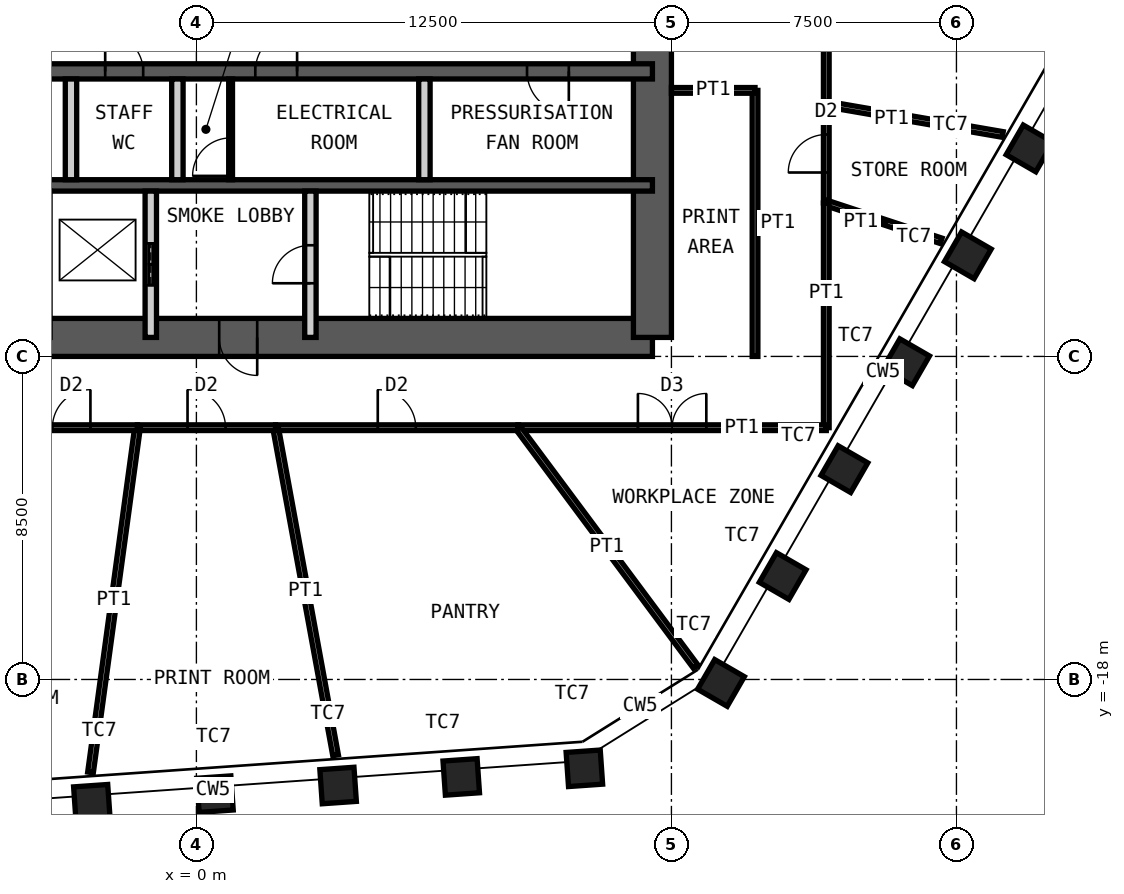
"""IFC4 building model, lengths in metres.
Left out: names, types, materials, properties, quantities, classifications, styles, units other than length and angle.
Written with IfcOpenShell. Run it as: python <this file> out.ifc"""

import sys

from ifc_helpers import new_model, si_unit, direction, frame, frame_2d, origin, origin_2d, place, context, subcontext, project, spatial, rectangle, hollow_rectangle, extrude, element, fill, save


model = new_model("IFC4")
c1 = context("Model", 3, precision=1e-05, world=origin(), true_north=direction((0.0, 1.0)))
c2 = subcontext(c1, "Body", "Model", "MODEL_VIEW")
j1 = project(units=[si_unit("LENGTHUNIT", "METRE"), si_unit("PLANEANGLEUNIT", "RADIAN")], contexts=[c1])
p1 = place(None, origin())
s1 = spatial("IfcSite", under=j1, at=p1, CompositionType="ELEMENT")
p2 = place(p1, origin())
s2 = spatial("IfcBuilding", under=s1, at=p2, CompositionType="ELEMENT")
p3 = place(p2, frame((0.0, 0.0, 278.8)))
s3 = spatial("IfcBuildingStorey", under=s2, at=p3, CompositionType="ELEMENT", Elevation=278.8)
for number, where, z_axis, x_axis in (
    (1, (21.924, -4.027, 0.0), (0.0, 0.0, 1.0), (0.5, 0.866, 0.0)),
    (2, (20.3, -6.84, 0.0), (0.0, 0.0, 1.0), (0.5, 0.866, 0.0)),
    (3, (18.676, -9.653, 0.0), (0.0, 0.0, 1.0), (0.5, 0.866, 0.0)),
    (4, (17.052, -12.466, 0.0), (0.0, 0.0, 1.0), (0.5, 0.866, 0.0)),
    (5, (15.427, -15.279, 0.0), (0.0, 0.0, 1.0), (0.5, 0.866, 0.0)),
    (6, (13.803, -18.092, 0.0), (0.0, 0.0, 1.0), (0.5, 0.866, 0.0)),
    (7, (10.209, -20.337, 0.0), (0.0, 0.0, 1.0), (0.998, 0.07, 0.0)),
    (8, (6.969, -20.564, 0.0), (0.0, 0.0, 1.0), (0.998, 0.07, 0.0)),
    (9, (3.729, -20.791, 0.0), (0.0, 0.0, 1.0), (0.998, 0.07, 0.0)),
    (10, (0.489, -21.017, 0.0), (0.0, 0.0, 1.0), (0.998, 0.07, 0.0)),
    (11, (-2.751, -21.244, 0.0), (0.0, 0.0, 1.0), (0.998, 0.07, 0.0)),
):
    element("IfcColumn", number, at=place(p3, frame(where, z_axis=z_axis, x_axis=x_axis)), inside=s3, PredefinedType="COLUMN", context=c2, shape_type="SweptSolid", body=[
        extrude(hollow_rectangle(XDim=0.9, YDim=0.9, WallThickness=0.06, at=origin_2d()), origin(), (0.0, 0.0, 1.0), 4.2),
    ])
p4 = place(p3, frame((-12.0, -9.0, 0.0), z_axis=(0.0, 0.0, 1.0), x_axis=(1.0, 0.0, 0.0)))
e12 = element("IfcWall", 12, at=p4, inside=s3, PredefinedType="SHEAR", context=c2, shape_type="SweptSolid", body=[
    extrude(rectangle(XDim=24.0, YDim=1.0, at=frame_2d((12.0, 0.0))), origin(), (0.0, 0.0, 1.0), 4.2),
])
p5 = place(p4, frame((1.35, 0.0, 0.0)))
e13 = element("IfcOpeningElement", 13, at=p5, cuts=e12, PredefinedType="OPENING", context=c2, shape_type="SweptSolid", body=[
    extrude(rectangle(XDim=1.0, YDim=2.1, at=frame_2d((0.5, 1.05))), frame((0.0, 0.51, 0.0), z_axis=(0.0, -1.0, 0.0), x_axis=(1.0, 0.0, 0.0)), (0.0, 0.0, 1.0), 1.02),
])
p6 = place(p4, frame((5.325, 0.0, 0.0)))
e14 = element("IfcOpeningElement", 14, at=p6, cuts=e12, PredefinedType="OPENING", context=c2, shape_type="SweptSolid", body=[
    extrude(rectangle(XDim=1.15, YDim=2.1, at=frame_2d((0.575, 1.05))), frame((0.0, 0.51, 0.0), z_axis=(0.0, -1.0, 0.0), x_axis=(1.0, 0.0, 0.0)), (0.0, 0.0, 1.0), 1.02),
])
p7 = place(p4, frame((12.6, 0.0, 0.0)))
e15 = element("IfcOpeningElement", 15, at=p7, cuts=e12, PredefinedType="OPENING", context=c2, shape_type="SweptSolid", body=[
    extrude(rectangle(XDim=1.0, YDim=2.1, at=frame_2d((0.5, 1.05))), frame((0.0, 0.51, 0.0), z_axis=(0.0, -1.0, 0.0), x_axis=(1.0, 0.0, 0.0)), (0.0, 0.0, 1.0), 1.02),
])
p8 = place(p3, frame((12.0, -9.0, 0.0), z_axis=(0.0, 0.0, 1.0), x_axis=(0.0, 1.0, 0.0)))
e16 = element("IfcWall", 16, at=p8, inside=s3, PredefinedType="SHEAR", context=c2, shape_type="SweptSolid", body=[
    extrude(rectangle(XDim=18.0, YDim=1.0, at=frame_2d((9.0, 0.0))), origin(), (0.0, 0.0, 1.0), 4.2),
])
p9 = place(p8, frame((8.1, 0.0, 0.0)))
e17 = element("IfcOpeningElement", 17, at=p9, cuts=e16, PredefinedType="OPENING", context=c2, shape_type="SweptSolid", body=[
    extrude(rectangle(XDim=1.8, YDim=2.1, at=frame_2d((0.9, 1.05))), frame((0.0, 0.51, 0.0), z_axis=(0.0, -1.0, 0.0), x_axis=(1.0, 0.0, 0.0)), (0.0, 0.0, 1.0), 1.02),
])
p10 = place(p3, frame((-12.0, -2.0, 0.0), z_axis=(0.0, 0.0, 1.0), x_axis=(1.0, 0.0, 0.0)))
e18 = element("IfcWall", 18, at=p10, inside=s3, PredefinedType="SHEAR", context=c2, shape_type="SweptSolid", body=[
    extrude(rectangle(XDim=24.0, YDim=0.4, at=frame_2d((12.0, 0.0))), origin(), (0.0, 0.0, 1.0), 4.2),
])
p11 = place(p10, frame((1.1, 0.0, 0.0)))
e19 = element("IfcOpeningElement", 19, at=p11, cuts=e18, PredefinedType="OPENING", context=c2, shape_type="SweptSolid", body=[
    extrude(rectangle(XDim=1.1, YDim=2.1, at=frame_2d((0.55, 1.05))), frame((0.0, 0.21, 0.0), z_axis=(0.0, -1.0, 0.0), x_axis=(1.0, 0.0, 0.0)), (0.0, 0.0, 1.0), 0.42),
])
p12 = place(p10, frame((13.55, 0.0, 0.0)))
e20 = element("IfcOpeningElement", 20, at=p12, cuts=e18, PredefinedType="OPENING", context=c2, shape_type="SweptSolid", body=[
    extrude(rectangle(XDim=1.1, YDim=2.1, at=frame_2d((0.55, 1.05))), frame((0.0, 0.21, 0.0), z_axis=(0.0, -1.0, 0.0), x_axis=(1.0, 0.0, 0.0)), (0.0, 0.0, 1.0), 0.42),
])
p13 = place(p10, frame((20.7, 0.0, 0.0)))
e21 = element("IfcOpeningElement", 21, at=p13, cuts=e18, PredefinedType="OPENING", context=c2, shape_type="SweptSolid", body=[
    extrude(rectangle(XDim=1.1, YDim=2.1, at=frame_2d((0.55, 1.05))), frame((0.0, 0.21, 0.0), z_axis=(0.0, -1.0, 0.0), x_axis=(1.0, 0.0, 0.0)), (0.0, 0.0, 1.0), 0.42),
])
p14 = place(p10, frame((4.0, 0.0, 0.0)))
e22 = element("IfcOpeningElement", 22, at=p14, cuts=e18, PredefinedType="OPENING", context=c2, shape_type="SweptSolid", body=[
    extrude(rectangle(XDim=1.0, YDim=2.1, at=frame_2d((0.5, 1.05))), frame((0.0, 0.21, 0.0), z_axis=(0.0, -1.0, 0.0), x_axis=(1.0, 0.0, 0.0)), (0.0, 0.0, 1.0), 0.42),
])
p15 = place(p10, frame((6.8, 0.0, 0.0)))
e23 = element("IfcOpeningElement", 23, at=p15, cuts=e18, PredefinedType="OPENING", context=c2, shape_type="SweptSolid", body=[
    extrude(rectangle(XDim=1.0, YDim=2.1, at=frame_2d((0.5, 1.05))), frame((0.0, 0.21, 0.0), z_axis=(0.0, -1.0, 0.0), x_axis=(1.0, 0.0, 0.0)), (0.0, 0.0, 1.0), 0.42),
])
p16 = place(p10, frame((9.6, 0.0, 0.0)))
e24 = element("IfcOpeningElement", 24, at=p16, cuts=e18, PredefinedType="OPENING", context=c2, shape_type="SweptSolid", body=[
    extrude(rectangle(XDim=1.0, YDim=2.1, at=frame_2d((0.5, 1.05))), frame((0.0, 0.21, 0.0), z_axis=(0.0, -1.0, 0.0), x_axis=(1.0, 0.0, 0.0)), (0.0, 0.0, 1.0), 0.42),
])
p17 = place(p3, frame((-12.0, -5.0, 0.0), z_axis=(0.0, 0.0, 1.0), x_axis=(1.0, 0.0, 0.0)))
e25 = element("IfcWall", 25, at=p17, inside=s3, PredefinedType="SHEAR", context=c2, shape_type="SweptSolid", body=[
    extrude(rectangle(XDim=24.0, YDim=0.3, at=frame_2d((12.0, 0.0))), origin(), (0.0, 0.0, 1.0), 4.2),
])
for number, where, z_axis, x_axis in (
    (26, (-3.3, -4.85, 0.0), (0.0, 0.0, 1.0), (0.0, 1.0, 0.0)),
    (27, (-0.5, -4.85, 0.0), (0.0, 0.0, 1.0), (0.0, 1.0, 0.0)),
    (28, (6.0, -4.85, 0.0), (0.0, 0.0, 1.0), (0.0, 1.0, 0.0)),
):
    element("IfcWall", number, at=place(p3, frame(where, z_axis=z_axis, x_axis=x_axis)), inside=s3, PredefinedType="PARTITIONING", context=c2, shape_type="SweptSolid", body=[
        extrude(rectangle(XDim=2.65, YDim=0.3, at=frame_2d((1.325, 0.0))), origin(), (0.0, 0.0, 1.0), 3.98),
    ])
p18 = place(p3, frame((-1.2, -9.0, 0.0), z_axis=(0.0, 0.0, 1.0), x_axis=(0.0, 1.0, 0.0)))
e29 = element("IfcWall", 29, at=p18, inside=s3, PredefinedType="PARTITIONING", context=c2, shape_type="SweptSolid", body=[
    extrude(rectangle(XDim=3.85, YDim=0.3, at=frame_2d((1.925, 0.0))), origin(), (0.0, 0.0, 1.0), 3.98),
])
p19 = place(p18, frame((1.375, 0.0, 0.0)))
e30 = element("IfcOpeningElement", 30, at=p19, cuts=e29, PredefinedType="OPENING", context=c2, shape_type="SweptSolid", body=[
    extrude(rectangle(XDim=1.1, YDim=2.4, at=frame_2d((0.55, 1.2))), frame((0.0, 0.16, 0.0), z_axis=(0.0, -1.0, 0.0), x_axis=(1.0, 0.0, 0.0)), (0.0, 0.0, 1.0), 0.32),
])
p20 = place(p3, frame((3.0, -9.0, 0.0), z_axis=(0.0, 0.0, 1.0), x_axis=(0.0, 1.0, 0.0)))
e31 = element("IfcWall", 31, at=p20, inside=s3, PredefinedType="PARTITIONING", context=c2, shape_type="SweptSolid", body=[
    extrude(rectangle(XDim=3.85, YDim=0.3, at=frame_2d((1.925, 0.0))), origin(), (0.0, 0.0, 1.0), 3.98),
])
p21 = place(p20, frame((1.425, 0.0, 0.0)))
e32 = element("IfcOpeningElement", 32, at=p21, cuts=e31, PredefinedType="OPENING", context=c2, shape_type="SweptSolid", body=[
    extrude(rectangle(XDim=1.0, YDim=2.1, at=frame_2d((0.5, 1.05))), frame((0.0, 0.16, 0.0), z_axis=(0.0, -1.0, 0.0), x_axis=(1.0, 0.0, 0.0)), (0.0, 0.0, 1.0), 0.32),
])
p22 = place(p3, frame((0.9, -4.85, 0.0), z_axis=(0.0, 0.0, 1.0), x_axis=(0.0, 1.0, 0.0)))
e33 = element("IfcWall", 33, at=p22, inside=s3, PredefinedType="PARTITIONING", context=c2, shape_type="SweptSolid", body=[
    extrude(rectangle(XDim=2.65, YDim=0.1, at=frame_2d((1.325, 0.0))), origin(), (0.0, 0.0, 1.0), 3.98),
])
p23 = place(p22, frame((0.1, 0.0, 0.0)))
e34 = element("IfcOpeningElement", 34, at=p23, cuts=e33, PredefinedType="OPENING", context=c2, shape_type="SweptSolid", body=[
    extrude(rectangle(XDim=1.0, YDim=2.4, at=frame_2d((0.5, 1.2))), frame((0.0, 0.06, 0.0), z_axis=(0.0, -1.0, 0.0), x_axis=(1.0, 0.0, 0.0)), (0.0, 0.0, 1.0), 0.12),
])
p24 = place(p3, frame((16.575, 1.788, 0.0), z_axis=(0.0, 0.0, 1.0), x_axis=(0.0, -1.0, 0.0)))
e35 = element("IfcWall", 35, at=p24, inside=s3, PredefinedType="PARTITIONING", context=c2, shape_type="SweptSolid", body=[
    extrude(rectangle(XDim=4.647, YDim=0.15, at=frame_2d((2.324, 0.0))), origin(), (0.0, 0.0, 1.0), 4.03),
])
p25 = place(p24, frame((1.824, 0.0, 0.0)))
e36 = element("IfcOpeningElement", 36, at=p25, cuts=e35, PredefinedType="OPENING", context=c2, shape_type="SweptSolid", body=[
    extrude(rectangle(XDim=1.0, YDim=2.4, at=frame_2d((0.5, 1.2))), frame((0.0, 0.085, 0.0), z_axis=(0.0, -1.0, 0.0), x_axis=(1.0, 0.0, 0.0)), (0.0, 0.0, 1.0), 0.17),
])
p26 = place(p3, frame((21.219, -3.66, 0.0), z_axis=(0.0, 0.0, 1.0), x_axis=(-0.985448448161, 0.16997457462, 0.0)))
e37 = element("IfcWall", 37, at=p26, inside=s3, PredefinedType="PARTITIONING", context=c2, shape_type="SweptSolid", body=[
    extrude(rectangle(XDim=4.713, YDim=0.15, at=frame_2d((2.356, 0.0))), origin(), (0.0, 0.0, 1.0), 4.03),
])
p27 = place(p3, frame((16.575, -2.859, 0.0), z_axis=(0.0, 0.0, 1.0), x_axis=(0.0, -1.0, 0.0)))
e38 = element("IfcWall", 38, at=p27, inside=s3, PredefinedType="PARTITIONING", context=c2, shape_type="SweptSolid", body=[
    extrude(rectangle(XDim=2.603, YDim=0.15, at=frame_2d((1.302, 0.0))), origin(), (0.0, 0.0, 1.0), 4.03),
])
p28 = place(p27, frame((0.802, 0.0, 0.0)))
e39 = element("IfcOpeningElement", 39, at=p28, cuts=e38, PredefinedType="OPENING", context=c2, shape_type="SweptSolid", body=[
    extrude(rectangle(XDim=1.0, YDim=2.4, at=frame_2d((0.5, 1.2))), frame((0.0, 0.085, 0.0), z_axis=(0.0, -1.0, 0.0), x_axis=(1.0, 0.0, 0.0)), (0.0, 0.0, 1.0), 0.17),
])
p29 = place(p3, frame((19.598, -6.459, 0.0), z_axis=(0.0, 0.0, 1.0), x_axis=(-0.949759114669, 0.312981827113, 0.0)))
e40 = element("IfcWall", 40, at=p29, inside=s3, PredefinedType="PARTITIONING", context=c2, shape_type="SweptSolid", body=[
    extrude(rectangle(XDim=3.183, YDim=0.15, at=frame_2d((1.592, 0.0))), origin(), (0.0, 0.0, 1.0), 3.33),
])
p30 = place(p3, frame((16.575, -5.462, 0.0), z_axis=(0.0, 0.0, 1.0), x_axis=(0.0, -1.0, 0.0)))
e41 = element("IfcWall", 41, at=p30, inside=s3, PredefinedType="PARTITIONING", context=c2, shape_type="SweptSolid", body=[
    extrude(rectangle(XDim=5.913, YDim=0.15, at=frame_2d((2.956, 0.0))), origin(), (0.0, 0.0, 1.0), 4.03),
])
p31 = place(p3, frame((16.575, -11.375, 0.0), z_axis=(0.0, 0.0, 1.0), x_axis=(-1.0, 0.0, 0.0)))
e42 = element("IfcWall", 42, at=p31, inside=s3, PredefinedType="PARTITIONING", context=c2, shape_type="SweptSolid", body=[
    extrude(rectangle(XDim=8.114, YDim=0.15, at=frame_2d((4.057, 0.0))), origin(), (0.0, 0.0, 1.0), 4.03),
])
p32 = place(p31, frame((3.157, 0.0, 0.0)))
e43 = element("IfcOpeningElement", 43, at=p32, cuts=e42, PredefinedType="OPENING", context=c2, shape_type="SweptSolid", body=[
    extrude(rectangle(XDim=1.8, YDim=2.4, at=frame_2d((0.9, 1.2))), frame((0.0, 0.085, 0.0), z_axis=(0.0, -1.0, 0.0), x_axis=(1.0, 0.0, 0.0)), (0.0, 0.0, 1.0), 0.17),
])
p33 = place(p3, frame((13.138, -17.661, 0.0), z_axis=(0.0, 0.0, 1.0), x_axis=(-0.596849390438, 0.802353291969, 0.0)))
e44 = element("IfcWall", 44, at=p33, inside=s3, PredefinedType="PARTITIONING", context=c2, shape_type="SweptSolid", body=[
    extrude(rectangle(XDim=7.835, YDim=0.15, at=frame_2d((3.917, 0.0))), origin(), (0.0, 0.0, 1.0), 2.93),
])
p34 = place(p3, frame((8.461, -11.375, 0.0), z_axis=(0.0, 0.0, 1.0), x_axis=(-1.0, 0.0, 0.0)))
e45 = element("IfcWall", 45, at=p34, inside=s3, PredefinedType="PARTITIONING", context=c2, shape_type="SweptSolid", body=[
    extrude(rectangle(XDim=6.378, YDim=0.15, at=frame_2d((3.189, 0.0))), origin(), (0.0, 0.0, 1.0), 4.03),
])
p35 = place(p34, frame((2.689, 0.0, 0.0)))
e46 = element("IfcOpeningElement", 46, at=p35, cuts=e45, PredefinedType="OPENING", context=c2, shape_type="SweptSolid", body=[
    extrude(rectangle(XDim=1.0, YDim=2.4, at=frame_2d((0.5, 1.2))), frame((0.0, 0.085, 0.0), z_axis=(0.0, -1.0, 0.0), x_axis=(1.0, 0.0, 0.0)), (0.0, 0.0, 1.0), 0.17),
])
p36 = place(p3, frame((3.662, -19.994, 0.0), z_axis=(0.0, 0.0, 1.0), x_axis=(-0.18018724377, 0.983632328252, 0.0)))
e47 = element("IfcWall", 47, at=p36, inside=s3, PredefinedType="PARTITIONING", context=c2, shape_type="SweptSolid", body=[
    extrude(rectangle(XDim=8.762, YDim=0.15, at=frame_2d((4.381, 0.0))), origin(), (0.0, 0.0, 1.0), 3.33),
])
p37 = place(p3, frame((2.083, -11.375, 0.0), z_axis=(0.0, 0.0, 1.0), x_axis=(-1.0, 0.0, 0.0)))
e48 = element("IfcWall", 48, at=p37, inside=s3, PredefinedType="PARTITIONING", context=c2, shape_type="SweptSolid", body=[
    extrude(rectangle(XDim=3.634, YDim=0.15, at=frame_2d((1.817, 0.0))), origin(), (0.0, 0.0, 1.0), 4.03),
])
p38 = place(p37, frame((1.317, 0.0, 0.0)))
e49 = element("IfcOpeningElement", 49, at=p38, cuts=e48, PredefinedType="OPENING", context=c2, shape_type="SweptSolid", body=[
    extrude(rectangle(XDim=1.0, YDim=2.4, at=frame_2d((0.5, 1.2))), frame((0.0, 0.085, 0.0), z_axis=(0.0, -1.0, 0.0), x_axis=(1.0, 0.0, 0.0)), (0.0, 0.0, 1.0), 0.17),
])
p39 = place(p3, frame((-2.786, -20.446, 0.0), z_axis=(0.0, 0.0, 1.0), x_axis=(0.135041803834, 0.99083990191, 0.0)))
e50 = element("IfcWall", 50, at=p39, inside=s3, PredefinedType="PARTITIONING", context=c2, shape_type="SweptSolid", body=[
    extrude(rectangle(XDim=9.155, YDim=0.15, at=frame_2d((4.578, 0.0))), origin(), (0.0, 0.0, 1.0), 3.33),
])
p40 = place(p3, frame((-1.55, -11.375, 0.0), z_axis=(0.0, 0.0, 1.0), x_axis=(-1.0, 0.0, 0.0)))
e51 = element("IfcWall", 51, at=p40, inside=s3, PredefinedType="PARTITIONING", context=c2, shape_type="SweptSolid", body=[
    extrude(rectangle(XDim=3.477, YDim=0.15, at=frame_2d((1.739, 0.0))), origin(), (0.0, 0.0, 1.0), 4.03),
])
p41 = place(p40, frame((1.239, 0.0, 0.0)))
e52 = element("IfcOpeningElement", 52, at=p41, cuts=e51, PredefinedType="OPENING", context=c2, shape_type="SweptSolid", body=[
    extrude(rectangle(XDim=1.0, YDim=2.4, at=frame_2d((0.5, 1.2))), frame((0.0, 0.085, 0.0), z_axis=(0.0, -1.0, 0.0), x_axis=(1.0, 0.0, 0.0)), (0.0, 0.0, 1.0), 0.17),
])
p42 = place(p3, frame((14.7, -9.5, 0.0), z_axis=(0.0, 0.0, 1.0), x_axis=(0.0, 1.0, 0.0)))
e53 = element("IfcWall", 53, at=p42, inside=s3, PredefinedType="PARTITIONING", context=c2, shape_type="SweptSolid", body=[
    extrude(rectangle(XDim=7.0, YDim=0.15, at=frame_2d((3.5, 0.0))), origin(), (0.0, 0.0, 1.0), 4.03),
])
p43 = place(p3, frame((12.5, -2.5, 0.0), z_axis=(0.0, 0.0, 1.0), x_axis=(1.0, 0.0, 0.0)))
e54 = element("IfcWall", 54, at=p43, inside=s3, PredefinedType="PARTITIONING", context=c2, shape_type="SweptSolid", body=[
    extrude(rectangle(XDim=2.2, YDim=0.15, at=frame_2d((1.1, 0.0))), origin(), (0.0, 0.0, 1.0), 3.33),
])
p44 = place(p7, origin())
e55 = element("IfcDoor", 55, at=p44, inside=s3, OperationType="SINGLE_SWING_RIGHT", PredefinedType="DOOR", context=c2, shape_type="SweptSolid", body=[
    extrude(rectangle(XDim=1.0, YDim=2.1, at=frame_2d((0.5, 1.05))), frame((0.0, 0.025, 0.0), z_axis=(0.0, -1.0, 0.0), x_axis=(1.0, 0.0, 0.0)), (0.0, 0.0, 1.0), 0.05),
])
fill(e15, e55)
p45 = place(p21, origin())
e56 = element("IfcDoor", 56, at=p45, inside=s3, OperationType="SINGLE_SWING_RIGHT", PredefinedType="DOOR", context=c2, shape_type="SweptSolid", body=[
    extrude(rectangle(XDim=1.0, YDim=2.1, at=frame_2d((0.5, 1.05))), frame((0.0, 0.025, 0.0), z_axis=(0.0, -1.0, 0.0), x_axis=(1.0, 0.0, 0.0)), (0.0, 0.0, 1.0), 0.05),
])
fill(e32, e56)
p46 = place(p12, origin())
e57 = element("IfcDoor", 57, at=p46, inside=s3, OperationType="SINGLE_SWING_LEFT", PredefinedType="DOOR", context=c2, shape_type="SweptSolid", body=[
    extrude(rectangle(XDim=1.1, YDim=2.1, at=frame_2d((0.55, 1.05))), frame((0.0, 0.025, 0.0), z_axis=(0.0, -1.0, 0.0), x_axis=(1.0, 0.0, 0.0)), (0.0, 0.0, 1.0), 0.05),
])
fill(e20, e57)
p47 = place(p13, origin())
e58 = element("IfcDoor", 58, at=p47, inside=s3, OperationType="SINGLE_SWING_RIGHT", PredefinedType="DOOR", context=c2, shape_type="SweptSolid", body=[
    extrude(rectangle(XDim=1.1, YDim=2.1, at=frame_2d((0.55, 1.05))), frame((0.0, 0.025, 0.0), z_axis=(0.0, -1.0, 0.0), x_axis=(1.0, 0.0, 0.0)), (0.0, 0.0, 1.0), 0.05),
])
fill(e21, e58)
p48 = place(p19, origin())
e59 = element("IfcDoor", 59, at=p48, inside=s3, OperationType="DOUBLE_DOOR_SLIDING", PredefinedType="DOOR", context=c2, shape_type="SweptSolid", body=[
    extrude(rectangle(XDim=1.1, YDim=2.4, at=frame_2d((0.55, 1.2))), frame((0.0, 0.025, 0.0), z_axis=(0.0, -1.0, 0.0), x_axis=(1.0, 0.0, 0.0)), (0.0, 0.0, 1.0), 0.05),
])
fill(e30, e59)
p49 = place(p16, origin())
e60 = element("IfcDoor", 60, at=p49, inside=s3, OperationType="SINGLE_SWING_RIGHT", PredefinedType="DOOR", context=c2, shape_type="SweptSolid", body=[
    extrude(rectangle(XDim=1.0, YDim=2.1, at=frame_2d((0.5, 1.05))), frame((0.0, 0.025, 0.0), z_axis=(0.0, -1.0, 0.0), x_axis=(1.0, 0.0, 0.0)), (0.0, 0.0, 1.0), 0.05),
])
fill(e24, e60)
p50 = place(p23, origin())
e61 = element("IfcDoor", 61, at=p50, inside=s3, OperationType="SINGLE_SWING_RIGHT", PredefinedType="DOOR", context=c2, shape_type="SweptSolid", body=[
    extrude(rectangle(XDim=1.0, YDim=2.4, at=frame_2d((0.5, 1.2))), frame((0.0, 0.025, 0.0), z_axis=(0.0, -1.0, 0.0), x_axis=(1.0, 0.0, 0.0)), (0.0, 0.0, 1.0), 0.05),
])
fill(e34, e61)
p51 = place(p28, origin())
e62 = element("IfcDoor", 62, at=p51, inside=s3, OperationType="SINGLE_SWING_RIGHT", PredefinedType="DOOR", context=c2, shape_type="SweptSolid", body=[
    extrude(rectangle(XDim=1.0, YDim=2.4, at=frame_2d((0.5, 1.2))), frame((0.0, 0.025, 0.0), z_axis=(0.0, -1.0, 0.0), x_axis=(1.0, 0.0, 0.0)), (0.0, 0.0, 1.0), 0.05),
])
fill(e39, e62)
p52 = place(p32, origin())
e63 = element("IfcDoor", 63, at=p52, inside=s3, OperationType="DOUBLE_DOOR_DOUBLE_SWING", PredefinedType="DOOR", context=c2, shape_type="SweptSolid", body=[
    extrude(rectangle(XDim=1.8, YDim=2.4, at=frame_2d((0.9, 1.2))), frame((0.0, 0.025, 0.0), z_axis=(0.0, -1.0, 0.0), x_axis=(1.0, 0.0, 0.0)), (0.0, 0.0, 1.0), 0.05),
])
fill(e43, e63)
p53 = place(p35, origin())
e64 = element("IfcDoor", 64, at=p53, inside=s3, OperationType="SINGLE_SWING_RIGHT", PredefinedType="DOOR", context=c2, shape_type="SweptSolid", body=[
    extrude(rectangle(XDim=1.0, YDim=2.4, at=frame_2d((0.5, 1.2))), frame((0.0, 0.025, 0.0), z_axis=(0.0, -1.0, 0.0), x_axis=(1.0, 0.0, 0.0)), (0.0, 0.0, 1.0), 0.05),
])
fill(e46, e64)
p54 = place(p38, origin())
e65 = element("IfcDoor", 65, at=p54, inside=s3, OperationType="SINGLE_SWING_RIGHT", PredefinedType="DOOR", context=c2, shape_type="SweptSolid", body=[
    extrude(rectangle(XDim=1.0, YDim=2.4, at=frame_2d((0.5, 1.2))), frame((0.0, 0.025, 0.0), z_axis=(0.0, -1.0, 0.0), x_axis=(1.0, 0.0, 0.0)), (0.0, 0.0, 1.0), 0.05),
])
fill(e49, e65)
p55 = place(p41, origin())
e66 = element("IfcDoor", 66, at=p55, inside=s3, OperationType="SINGLE_SWING_LEFT", PredefinedType="DOOR", context=c2, shape_type="SweptSolid", body=[
    extrude(rectangle(XDim=1.0, YDim=2.4, at=frame_2d((0.5, 1.2))), frame((0.0, 0.025, 0.0), z_axis=(0.0, -1.0, 0.0), x_axis=(1.0, 0.0, 0.0)), (0.0, 0.0, 1.0), 0.05),
])
fill(e52, e66)
save(model, sys.argv[1])
